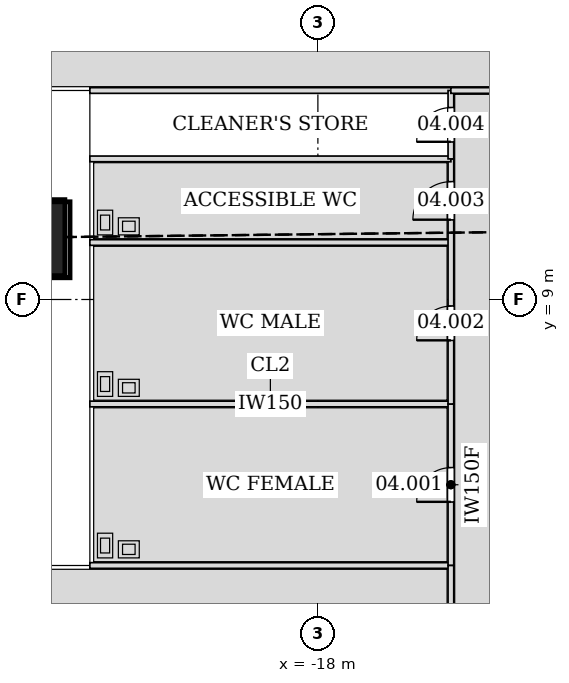
"""IFC4 building model, lengths in metres.
Left out: names, types, materials, properties, quantities, classifications, styles, units other than length and angle.
Written with IfcOpenShell. Run it as: python <this file> out.ifc"""

import sys

from ifc_helpers import new_model, si_unit, direction, frame, frame_2d, origin, origin_2d, place, context, subcontext, project, spatial, rectangle, hollow_rectangle, extrude, element, fill, save


model = new_model("IFC4")
c1 = context("Model", 3, precision=1e-05, world=origin(), true_north=direction((0.0, 1.0)))
c2 = subcontext(c1, "Body", "Model", "MODEL_VIEW")
j1 = project(units=[si_unit("LENGTHUNIT", "METRE"), si_unit("PLANEANGLEUNIT", "RADIAN")], contexts=[c1])
p1 = place(None, origin())
s1 = spatial("IfcSite", under=j1, at=p1, CompositionType="ELEMENT")
p2 = place(p1, origin())
s2 = spatial("IfcBuilding", under=s1, at=p2, CompositionType="ELEMENT")
p3 = place(p2, frame((0.0, 0.0, 24.0)))
s3 = spatial("IfcBuildingStorey", under=s2, at=p3, CompositionType="ELEMENT", Elevation=24.0)
p4 = place(p3, frame((-25.657, 10.628, 0.0), z_axis=(0.028266101221, -0.011692811656, 0.999532043347), x_axis=(0.382253928177, 0.924057322028, 0.0)))
e1 = element("IfcColumn", 1, at=p4, inside=s3, PredefinedType="COLUMN", context=c2, shape_type="SweptSolid", body=[
    extrude(hollow_rectangle(XDim=2.0, YDim=2.0, WallThickness=0.09, at=origin_2d()), origin(), (0.0, 0.0, 1.0), 4.802),
])
p5 = place(p3, frame((-14.788, 35.876, 0.0), z_axis=(0.0, 0.0, 1.0), x_axis=(-0.707106781187, -0.707106781187, 0.0)))
e2 = element("IfcWall", 2, at=p5, inside=s3, PredefinedType="SOLIDWALL", context=c2, shape_type="SweptSolid", body=[
    extrude(rectangle(XDim=29.823, YDim=0.35, at=frame_2d((14.912, 0.0))), origin(), (0.0, 0.0, 1.0), 4.5),
])
p6 = place(p5, frame((0.822, 0.0, 0.9)))
e3 = element("IfcOpeningElement", 3, at=p6, cuts=e2, PredefinedType="OPENING", context=c2, shape_type="SweptSolid", body=[
    extrude(rectangle(XDim=1.2, YDim=3.0, at=frame_2d((0.6, 1.5))), frame((0.0, 0.185, 0.0), z_axis=(0.0, -1.0, 0.0), x_axis=(1.0, 0.0, 0.0)), (0.0, 0.0, 1.0), 0.37),
])
p7 = place(p5, frame((3.52, 0.0, 0.9)))
e4 = element("IfcOpeningElement", 4, at=p7, cuts=e2, PredefinedType="OPENING", context=c2, shape_type="SweptSolid", body=[
    extrude(rectangle(XDim=1.2, YDim=3.0, at=frame_2d((0.6, 1.5))), frame((0.0, 0.185, 0.0), z_axis=(0.0, -1.0, 0.0), x_axis=(1.0, 0.0, 0.0)), (0.0, 0.0, 1.0), 0.37),
])
p8 = place(p5, frame((6.218, 0.0, 0.9)))
e5 = element("IfcOpeningElement", 5, at=p8, cuts=e2, PredefinedType="OPENING", context=c2, shape_type="SweptSolid", body=[
    extrude(rectangle(XDim=1.2, YDim=3.0, at=frame_2d((0.6, 1.5))), frame((0.0, 0.185, 0.0), z_axis=(0.0, -1.0, 0.0), x_axis=(1.0, 0.0, 0.0)), (0.0, 0.0, 1.0), 0.37),
])
p9 = place(p5, frame((8.916, 0.0, 0.9)))
e6 = element("IfcOpeningElement", 6, at=p9, cuts=e2, PredefinedType="OPENING", context=c2, shape_type="SweptSolid", body=[
    extrude(rectangle(XDim=1.2, YDim=3.0, at=frame_2d((0.6, 1.5))), frame((0.0, 0.185, 0.0), z_axis=(0.0, -1.0, 0.0), x_axis=(1.0, 0.0, 0.0)), (0.0, 0.0, 1.0), 0.37),
])
p10 = place(p5, frame((11.614, 0.0, 0.9)))
e7 = element("IfcOpeningElement", 7, at=p10, cuts=e2, PredefinedType="OPENING", context=c2, shape_type="SweptSolid", body=[
    extrude(rectangle(XDim=1.2, YDim=3.0, at=frame_2d((0.6, 1.5))), frame((0.0, 0.185, 0.0), z_axis=(0.0, -1.0, 0.0), x_axis=(1.0, 0.0, 0.0)), (0.0, 0.0, 1.0), 0.37),
])
p11 = place(p5, frame((14.312, 0.0, 0.9)))
e8 = element("IfcOpeningElement", 8, at=p11, cuts=e2, PredefinedType="OPENING", context=c2, shape_type="SweptSolid", body=[
    extrude(rectangle(XDim=1.2, YDim=3.0, at=frame_2d((0.6, 1.5))), frame((0.0, 0.185, 0.0), z_axis=(0.0, -1.0, 0.0), x_axis=(1.0, 0.0, 0.0)), (0.0, 0.0, 1.0), 0.37),
])
p12 = place(p5, frame((17.01, 0.0, 0.9)))
e9 = element("IfcOpeningElement", 9, at=p12, cuts=e2, PredefinedType="OPENING", context=c2, shape_type="SweptSolid", body=[
    extrude(rectangle(XDim=1.2, YDim=3.0, at=frame_2d((0.6, 1.5))), frame((0.0, 0.185, 0.0), z_axis=(0.0, -1.0, 0.0), x_axis=(1.0, 0.0, 0.0)), (0.0, 0.0, 1.0), 0.37),
])
p13 = place(p5, frame((19.708, 0.0, 0.9)))
e10 = element("IfcOpeningElement", 10, at=p13, cuts=e2, PredefinedType="OPENING", context=c2, shape_type="SweptSolid", body=[
    extrude(rectangle(XDim=1.2, YDim=3.0, at=frame_2d((0.6, 1.5))), frame((0.0, 0.185, 0.0), z_axis=(0.0, -1.0, 0.0), x_axis=(1.0, 0.0, 0.0)), (0.0, 0.0, 1.0), 0.37),
])
p14 = place(p5, frame((22.406, 0.0, 0.9)))
e11 = element("IfcOpeningElement", 11, at=p14, cuts=e2, PredefinedType="OPENING", context=c2, shape_type="SweptSolid", body=[
    extrude(rectangle(XDim=1.2, YDim=3.0, at=frame_2d((0.6, 1.5))), frame((0.0, 0.185, 0.0), z_axis=(0.0, -1.0, 0.0), x_axis=(1.0, 0.0, 0.0)), (0.0, 0.0, 1.0), 0.37),
])
p15 = place(p5, frame((25.104, 0.0, 0.9)))
e12 = element("IfcOpeningElement", 12, at=p15, cuts=e2, PredefinedType="OPENING", context=c2, shape_type="SweptSolid", body=[
    extrude(rectangle(XDim=1.2, YDim=3.0, at=frame_2d((0.6, 1.5))), frame((0.0, 0.185, 0.0), z_axis=(0.0, -1.0, 0.0), x_axis=(1.0, 0.0, 0.0)), (0.0, 0.0, 1.0), 0.37),
])
p16 = place(p5, frame((27.802, 0.0, 0.9)))
e13 = element("IfcOpeningElement", 13, at=p16, cuts=e2, PredefinedType="OPENING", context=c2, shape_type="SweptSolid", body=[
    extrude(rectangle(XDim=1.2, YDim=3.0, at=frame_2d((0.6, 1.5))), frame((0.0, 0.185, 0.0), z_axis=(0.0, -1.0, 0.0), x_axis=(1.0, 0.0, 0.0)), (0.0, 0.0, 1.0), 0.37),
])
for number, where, z_axis, x_axis in (
    (14, (-14.5, 6.25, 0.0), (0.0, 0.0, 1.0), (-1.0, 0.0, 0.0)),
    (15, (-24.0, 2.0, 0.0), (0.0, 0.0, 1.0), (1.0, 0.0, 0.0)),
):
    element("IfcWall", number, at=place(p3, frame(where, z_axis=z_axis, x_axis=x_axis)), inside=s3, PredefinedType="PARTITIONING", context=c2, shape_type="SweptSolid", body=[
        extrude(rectangle(XDim=9.5, YDim=0.15, at=frame_2d((4.75, 0.0))), origin(), (0.0, 0.0, 1.0), 3.507),
    ])
p17 = place(p3, frame((-14.5, 2.0, 0.0), z_axis=(0.0, 0.0, 1.0), x_axis=(0.0, 1.0, 0.0)))
e16 = element("IfcWall", 16, at=p17, inside=s3, PredefinedType="PARTITIONING", context=c2, shape_type="SweptSolid", body=[
    extrude(rectangle(XDim=4.25, YDim=0.15, at=frame_2d((2.125, 0.0))), origin(), (0.0, 0.0, 1.0), 4.5),
])
p18 = place(p17, frame((1.675, 0.0, 0.0)))
e17 = element("IfcOpeningElement", 17, at=p18, cuts=e16, PredefinedType="OPENING", context=c2, shape_type="SweptSolid", body=[
    extrude(rectangle(XDim=0.9, YDim=2.1, at=frame_2d((0.45, 1.05))), frame((0.0, 0.085, 0.0), z_axis=(0.0, -1.0, 0.0), x_axis=(1.0, 0.0, 0.0)), (0.0, 0.0, 1.0), 0.17),
])
p19 = place(p3, frame((-14.5, 10.5, 0.0), z_axis=(0.0, 0.0, 1.0), x_axis=(-1.0, 0.0, 0.0)))
e18 = element("IfcWall", 18, at=p19, inside=s3, PredefinedType="PARTITIONING", context=c2, shape_type="SweptSolid", body=[
    extrude(rectangle(XDim=9.5, YDim=0.15, at=frame_2d((4.75, 0.0))), origin(), (0.0, 0.0, 1.0), 3.19),
])
p20 = place(p3, frame((-14.5, 6.25, 0.0), z_axis=(0.0, 0.0, 1.0), x_axis=(0.0, 1.0, 0.0)))
e19 = element("IfcWall", 19, at=p20, inside=s3, PredefinedType="PARTITIONING", context=c2, shape_type="SweptSolid", body=[
    extrude(rectangle(XDim=6.45, YDim=0.15, at=frame_2d((3.225, 0.0))), origin(), (0.0, 0.0, 1.0), 3.19),
])
p21 = place(p20, frame((1.675, 0.0, 0.0)))
e20 = element("IfcOpeningElement", 20, at=p21, cuts=e19, PredefinedType="OPENING", context=c2, shape_type="SweptSolid", body=[
    extrude(rectangle(XDim=0.9, YDim=2.1, at=frame_2d((0.45, 1.05))), frame((0.0, 0.085, 0.0), z_axis=(0.0, -1.0, 0.0), x_axis=(1.0, 0.0, 0.0)), (0.0, 0.0, 1.0), 0.17),
])
p22 = place(p20, frame((4.85, 0.0, 0.0)))
e21 = element("IfcOpeningElement", 21, at=p22, cuts=e19, PredefinedType="OPENING", context=c2, shape_type="SweptSolid", body=[
    extrude(rectangle(XDim=1.0, YDim=2.1, at=frame_2d((0.5, 1.05))), frame((0.0, 0.085, 0.0), z_axis=(0.0, -1.0, 0.0), x_axis=(1.0, 0.0, 0.0)), (0.0, 0.0, 1.0), 0.17),
])
p23 = place(p3, frame((-14.5, 12.7, 0.0), z_axis=(0.0, 0.0, 1.0), x_axis=(-1.0, 0.0, 0.0)))
e22 = element("IfcWall", 22, at=p23, inside=s3, PredefinedType="PARTITIONING", context=c2, shape_type="SweptSolid", body=[
    extrude(rectangle(XDim=9.5, YDim=0.15, at=frame_2d((4.75, 0.0))), origin(), (0.0, 0.0, 1.0), 3.649),
])
p24 = place(p3, frame((-14.5, 14.5, 0.0), z_axis=(0.0, 0.0, 1.0), x_axis=(-1.0, 0.0, 0.0)))
e23 = element("IfcWall", 23, at=p24, inside=s3, PredefinedType="PARTITIONING", context=c2, shape_type="SweptSolid", body=[
    extrude(rectangle(XDim=9.5, YDim=0.15, at=frame_2d((4.75, 0.0))), origin(), (0.0, 0.0, 1.0), 3.448),
])
p25 = place(p3, frame((-14.5, 12.7, 0.0), z_axis=(0.0, 0.0, 1.0), x_axis=(0.0, 1.0, 0.0)))
e24 = element("IfcWall", 24, at=p25, inside=s3, PredefinedType="PARTITIONING", context=c2, shape_type="SweptSolid", body=[
    extrude(rectangle(XDim=1.8, YDim=0.15, at=frame_2d((0.9, 0.0))), origin(), (0.0, 0.0, 1.0), 3.448),
])
p26 = place(p25, frame((0.45, 0.0, 0.0)))
e25 = element("IfcOpeningElement", 25, at=p26, cuts=e24, PredefinedType="OPENING", context=c2, shape_type="SweptSolid", body=[
    extrude(rectangle(XDim=0.9, YDim=2.1, at=frame_2d((0.45, 1.05))), frame((0.0, 0.085, 0.0), z_axis=(0.0, -1.0, 0.0), x_axis=(1.0, 0.0, 0.0)), (0.0, 0.0, 1.0), 0.17),
])
p27 = place(p3, frame((-14.5, -14.5, 0.0), z_axis=(0.0, 0.0, 1.0), x_axis=(0.0, 1.0, 0.0)))
e26 = element("IfcWall", 26, at=p27, inside=s3, PredefinedType="PARTITIONING", context=c2, shape_type="SweptSolid", body=[
    extrude(rectangle(XDim=16.5, YDim=0.15, at=frame_2d((8.25, 0.0))), origin(), (0.0, 0.0, 1.0), 3.19),
])
p28 = place(p3, frame((-14.501, 14.5, 0.0), z_axis=(0.0, 0.0, 1.0), x_axis=(1.0, 0.0, 0.0)))
e27 = element("IfcWall", 27, at=p28, inside=s3, PredefinedType="PARTITIONING", context=c2, shape_type="SweptSolid", body=[
    extrude(rectangle(XDim=29.002, YDim=0.15, at=frame_2d((14.501, 0.0))), origin(), (0.0, 0.0, 1.0), 3.19),
])
p29 = place(p28, frame((7.025, 0.0, 0.0)))
e28 = element("IfcOpeningElement", 28, at=p29, cuts=e27, PredefinedType="OPENING", context=c2, shape_type="SweptSolid", body=[
    extrude(rectangle(XDim=1.8, YDim=2.4, at=frame_2d((0.9, 1.2))), frame((0.0, 0.085, 0.0), z_axis=(0.0, -1.0, 0.0), x_axis=(1.0, 0.0, 0.0)), (0.0, 0.0, 1.0), 0.17),
])
p30 = place(p28, frame((21.527, 0.0, 0.0)))
e29 = element("IfcOpeningElement", 29, at=p30, cuts=e27, PredefinedType="OPENING", context=c2, shape_type="SweptSolid", body=[
    extrude(rectangle(XDim=1.8, YDim=2.4, at=frame_2d((0.9, 1.2))), frame((0.0, 0.085, 0.0), z_axis=(0.0, -1.0, 0.0), x_axis=(1.0, 0.0, 0.0)), (0.0, 0.0, 1.0), 0.17),
])
p31 = place(p18, origin())
e30 = element("IfcDoor", 30, at=p31, inside=s3, OperationType="SINGLE_SWING_LEFT", PredefinedType="DOOR", context=c2, shape_type="SweptSolid", body=[
    extrude(rectangle(XDim=0.9, YDim=2.1, at=frame_2d((0.45, 1.05))), frame((0.0, 0.025, 0.0), z_axis=(0.0, -1.0, 0.0), x_axis=(1.0, 0.0, 0.0)), (0.0, 0.0, 1.0), 0.05),
])
fill(e17, e30)
p32 = place(p21, origin())
e31 = element("IfcDoor", 31, at=p32, inside=s3, OperationType="SINGLE_SWING_LEFT", PredefinedType="DOOR", context=c2, shape_type="SweptSolid", body=[
    extrude(rectangle(XDim=0.9, YDim=2.1, at=frame_2d((0.45, 1.05))), frame((0.0, 0.025, 0.0), z_axis=(0.0, -1.0, 0.0), x_axis=(1.0, 0.0, 0.0)), (0.0, 0.0, 1.0), 0.05),
])
fill(e20, e31)
p33 = place(p22, origin())
e32 = element("IfcDoor", 32, at=p33, inside=s3, OperationType="SINGLE_SWING_LEFT", PredefinedType="DOOR", context=c2, shape_type="SweptSolid", body=[
    extrude(rectangle(XDim=1.0, YDim=2.1, at=frame_2d((0.5, 1.05))), frame((0.0, 0.025, 0.0), z_axis=(0.0, -1.0, 0.0), x_axis=(1.0, 0.0, 0.0)), (0.0, 0.0, 1.0), 0.05),
])
fill(e21, e32)
p34 = place(p26, origin())
e33 = element("IfcDoor", 33, at=p34, inside=s3, OperationType="SINGLE_SWING_LEFT", PredefinedType="DOOR", context=c2, shape_type="SweptSolid", body=[
    extrude(rectangle(XDim=0.9, YDim=2.1, at=frame_2d((0.45, 1.05))), frame((0.0, 0.025, 0.0), z_axis=(0.0, -1.0, 0.0), x_axis=(1.0, 0.0, 0.0)), (0.0, 0.0, 1.0), 0.05),
])
fill(e25, e33)
save(model, sys.argv[1])
